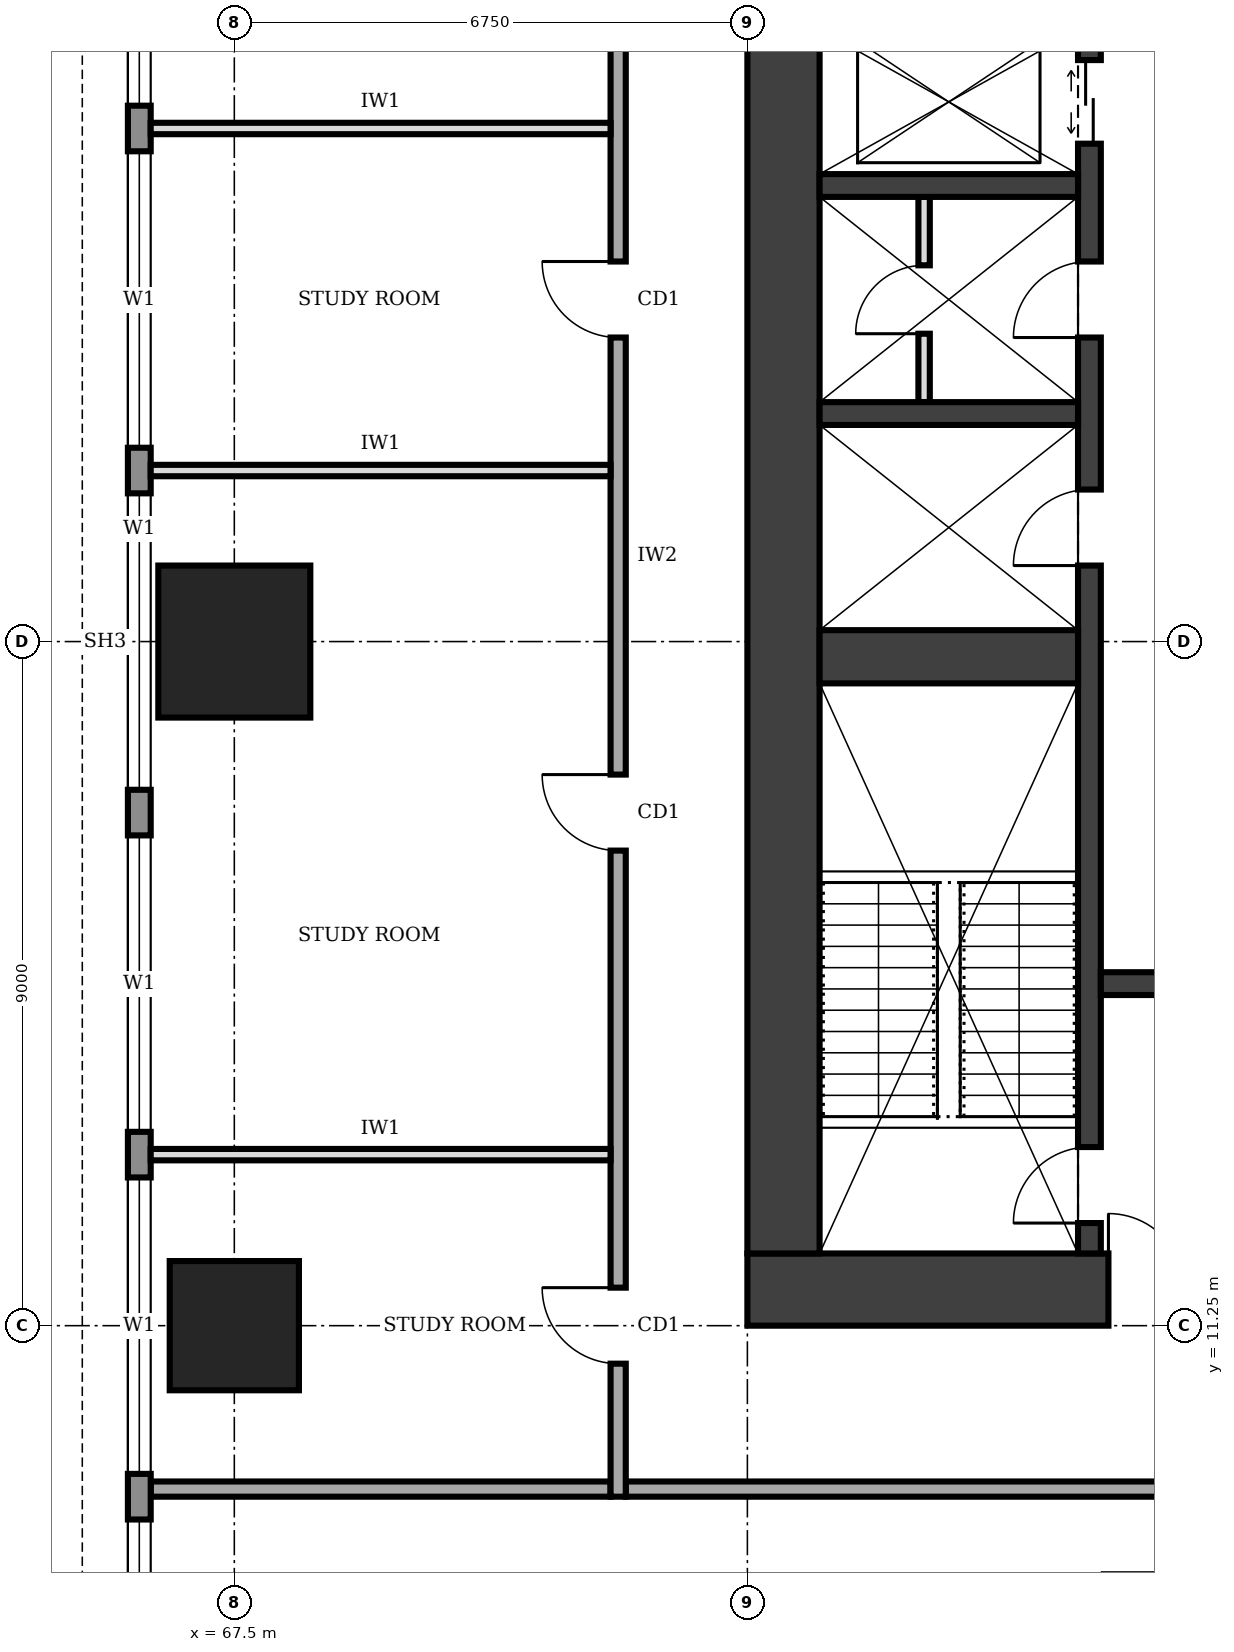
"""IFC4 building model, lengths in metres.
Left out: names, types, materials, properties, quantities, classifications, styles, units other than length and angle.
Written with IfcOpenShell. Run it as: python <this file> out.ifc"""

import sys

from ifc_helpers import new_model, si_unit, direction, frame, frame_2d, origin, origin_2d, place, context, subcontext, project, spatial, rectangle, extrude, element, fill, save


model = new_model("IFC4")
c1 = context("Model", 3, precision=1e-05, world=origin(), true_north=direction((0.0, 1.0)))
c2 = subcontext(c1, "Body", "Model", "MODEL_VIEW")
j1 = project(units=[si_unit("LENGTHUNIT", "METRE"), si_unit("PLANEANGLEUNIT", "RADIAN")], contexts=[c1])
p1 = place(None, origin())
s1 = spatial("IfcSite", under=j1, at=p1, CompositionType="ELEMENT")
p2 = place(p1, origin())
s2 = spatial("IfcBuilding", under=s1, at=p2, CompositionType="ELEMENT")
p3 = place(p2, frame((0.0, 0.0, 217.0)))
s3 = spatial("IfcBuildingStorey", under=s2, at=p3, CompositionType="ELEMENT", Elevation=217.0)
p4 = place(p3, frame((74.25, 11.725, 0.0), z_axis=(0.0, 0.0, 1.0), x_axis=(1.0, 0.0, 0.0)))
e1 = element("IfcWall", 1, at=p4, inside=s3, PredefinedType="SHEAR", context=c2, shape_type="SweptSolid", body=[
    extrude(rectangle(XDim=13.5, YDim=0.95, at=frame_2d((6.75, 0.0))), origin(), (0.0, 0.0, 1.0), 4.0),
])
p5 = place(p4, frame((4.75, 0.0, 0.0)))
e2 = element("IfcOpeningElement", 2, at=p5, cuts=e1, PredefinedType="OPENING", context=c2, shape_type="SweptSolid", body=[
    extrude(rectangle(XDim=1.0, YDim=2.1, at=frame_2d((0.5, 1.05))), frame((0.0, 0.485, 0.0), z_axis=(0.0, -1.0, 0.0), x_axis=(1.0, 0.0, 0.0)), (0.0, 0.0, 1.0), 0.97),
])
p6 = place(p3, frame((74.725, 28.3, 0.0), z_axis=(0.0, 0.0, 1.0), x_axis=(0.0, -1.0, 0.0)))
e3 = element("IfcWall", 3, at=p6, inside=s3, PredefinedType="SHEAR", context=c2, shape_type="SweptSolid", body=[
    extrude(rectangle(XDim=16.1, YDim=0.95, at=frame_2d((8.05, 0.0))), origin(), (0.0, 0.0, 1.0), 4.0),
])
p7 = place(p3, frame((78.75, 12.2, 0.0), z_axis=(0.0, 0.0, 1.0), x_axis=(0.0, 1.0, 0.0)))
e4 = element("IfcWall", 4, at=p7, inside=s3, PredefinedType="SHEAR", context=c2, shape_type="SweptSolid", body=[
    extrude(rectangle(XDim=16.1, YDim=0.3, at=frame_2d((8.05, 0.0))), origin(), (0.0, 0.0, 1.0), 4.0),
])
p8 = place(p7, frame((0.4, 0.0, 0.0)))
e5 = element("IfcOpeningElement", 5, at=p8, cuts=e4, PredefinedType="OPENING", context=c2, shape_type="SweptSolid", body=[
    extrude(rectangle(XDim=1.0, YDim=2.1, at=frame_2d((0.5, 1.05))), frame((0.0, 0.16, 0.0), z_axis=(0.0, -1.0, 0.0), x_axis=(1.0, 0.0, 0.0)), (0.0, 0.0, 1.0), 0.32),
])
p9 = place(p7, frame((14.6, 0.0, 0.0)))
e6 = element("IfcOpeningElement", 6, at=p9, cuts=e4, PredefinedType="OPENING", context=c2, shape_type="SweptSolid", body=[
    extrude(rectangle(XDim=1.1, YDim=2.1, at=frame_2d((0.55, 1.05))), frame((0.0, 0.16, 0.0), z_axis=(0.0, -1.0, 0.0), x_axis=(1.0, 0.0, 0.0)), (0.0, 0.0, 1.0), 0.32),
])
p10 = place(p7, frame((9.05, 0.0, 0.0)))
e7 = element("IfcOpeningElement", 7, at=p10, cuts=e4, PredefinedType="OPENING", context=c2, shape_type="SweptSolid", body=[
    extrude(rectangle(XDim=1.0, YDim=2.1, at=frame_2d((0.5, 1.05))), frame((0.0, 0.16, 0.0), z_axis=(0.0, -1.0, 0.0), x_axis=(1.0, 0.0, 0.0)), (0.0, 0.0, 1.0), 0.32),
])
p11 = place(p7, frame((12.05, 0.0, 0.0)))
e8 = element("IfcOpeningElement", 8, at=p11, cuts=e4, PredefinedType="OPENING", context=c2, shape_type="SweptSolid", body=[
    extrude(rectangle(XDim=1.0, YDim=2.1, at=frame_2d((0.5, 1.05))), frame((0.0, 0.16, 0.0), z_axis=(0.0, -1.0, 0.0), x_axis=(1.0, 0.0, 0.0)), (0.0, 0.0, 1.0), 0.32),
])
p12 = place(p3, frame((75.2, 20.05, 0.0), z_axis=(0.0, 0.0, 1.0), x_axis=(1.0, 0.0, 0.0)))
e9 = element("IfcWall", 9, at=p12, inside=s3, PredefinedType="SHEAR", context=c2, shape_type="SweptSolid", body=[
    extrude(rectangle(XDim=3.4, YDim=0.7, at=frame_2d((1.7, 0.0))), origin(), (0.0, 0.0, 1.0), 4.0),
])
p13 = place(p3, frame((78.9, 15.75, 0.0), z_axis=(0.0, 0.0, 1.0), x_axis=(1.0, 0.0, 0.0)))
e10 = element("IfcWall", 10, at=p13, inside=s3, PredefinedType="SHEAR", context=c2, shape_type="SweptSolid", body=[
    extrude(rectangle(XDim=4.2, YDim=0.3, at=frame_2d((2.1, 0.0))), origin(), (0.0, 0.0, 1.0), 4.0),
])
p14 = place(p13, frame((1.6, 0.0, 0.0)))
e11 = element("IfcOpeningElement", 11, at=p14, cuts=e10, PredefinedType="OPENING", context=c2, shape_type="SweptSolid", body=[
    extrude(rectangle(XDim=1.0, YDim=2.1, at=frame_2d((0.5, 1.05))), frame((0.0, 0.16, 0.0), z_axis=(0.0, -1.0, 0.0), x_axis=(1.0, 0.0, 0.0)), (0.0, 0.0, 1.0), 0.32),
])
for number, where, z_axis, x_axis in (
    (12, (75.2, 23.25, 0.0), (0.0, 0.0, 1.0), (1.0, 0.0, 0.0)),
    (13, (75.2, 26.25, 0.0), (0.0, 0.0, 1.0), (1.0, 0.0, 0.0)),
):
    element("IfcWall", number, at=place(p3, frame(where, z_axis=z_axis, x_axis=x_axis)), inside=s3, PredefinedType="SHEAR", context=c2, shape_type="SweptSolid", body=[
        extrude(rectangle(XDim=3.4, YDim=0.3, at=frame_2d((1.7, 0.0))), origin(), (0.0, 0.0, 1.0), 4.0),
    ])
p15 = place(p3, frame((67.5, 11.25, 0.0), z_axis=(0.0, 0.0, 1.0), x_axis=(1.0, 0.0, 0.0)))
e14 = element("IfcColumn", 14, at=p15, inside=s3, PredefinedType="COLUMN", context=c2, shape_type="SweptSolid", body=[
    extrude(rectangle(XDim=1.7, YDim=1.7, at=origin_2d()), origin(), (0.0, 0.0, 1.0), 4.0),
])
p16 = place(p3, frame((67.5, 20.25, 0.0), z_axis=(0.0, 0.0, 1.0), x_axis=(1.0, 0.0, 0.0)))
e15 = element("IfcColumn", 15, at=p16, inside=s3, PredefinedType="COLUMN", context=c2, shape_type="SweptSolid", body=[
    extrude(rectangle(XDim=2.0, YDim=2.0, at=origin_2d()), origin(), (0.0, 0.0, 1.0), 4.0),
])
p17 = place(p3, frame((66.25, 37.18, 0.0), z_axis=(0.0, 0.0, 1.0), x_axis=(0.0, -1.0, 0.0)))
e16 = element("IfcWall", 16, at=p17, inside=s3, PredefinedType="STANDARD", context=c2, shape_type="SweptSolid", body=[
    extrude(rectangle(XDim=33.86, YDim=0.3, at=frame_2d((16.93, 0.0))), origin(), (0.0, 0.0, 1.0), 3.75),
])
p18 = place(p17, frame((28.48, 0.0, 0.9)))
e17 = element("IfcOpeningElement", 17, at=p18, cuts=e16, PredefinedType="OPENING", context=c2, shape_type="SweptSolid", body=[
    extrude(rectangle(XDim=3.9, YDim=2.2, at=frame_2d((1.95, 1.1))), frame((0.0, 0.16, 0.0), z_axis=(0.0, -1.0, 0.0), x_axis=(1.0, 0.0, 0.0)), (0.0, 0.0, 1.0), 0.32),
])
p19 = place(p17, frame((23.98, 0.0, 0.9)))
e18 = element("IfcOpeningElement", 18, at=p19, cuts=e16, PredefinedType="OPENING", context=c2, shape_type="SweptSolid", body=[
    extrude(rectangle(XDim=3.9, YDim=2.2, at=frame_2d((1.95, 1.1))), frame((0.0, 0.16, 0.0), z_axis=(0.0, -1.0, 0.0), x_axis=(1.0, 0.0, 0.0)), (0.0, 0.0, 1.0), 0.32),
])
p20 = place(p17, frame((19.48, 0.0, 0.9)))
e19 = element("IfcOpeningElement", 19, at=p20, cuts=e16, PredefinedType="OPENING", context=c2, shape_type="SweptSolid", body=[
    extrude(rectangle(XDim=3.9, YDim=2.2, at=frame_2d((1.95, 1.1))), frame((0.0, 0.16, 0.0), z_axis=(0.0, -1.0, 0.0), x_axis=(1.0, 0.0, 0.0)), (0.0, 0.0, 1.0), 0.32),
])
p21 = place(p17, frame((14.98, 0.0, 0.9)))
e20 = element("IfcOpeningElement", 20, at=p21, cuts=e16, PredefinedType="OPENING", context=c2, shape_type="SweptSolid", body=[
    extrude(rectangle(XDim=3.9, YDim=2.2, at=frame_2d((1.95, 1.1))), frame((0.0, 0.16, 0.0), z_axis=(0.0, -1.0, 0.0), x_axis=(1.0, 0.0, 0.0)), (0.0, 0.0, 1.0), 0.32),
])
p22 = place(p17, frame((10.48, 0.0, 0.9)))
e21 = element("IfcOpeningElement", 21, at=p22, cuts=e16, PredefinedType="OPENING", context=c2, shape_type="SweptSolid", body=[
    extrude(rectangle(XDim=3.9, YDim=2.2, at=frame_2d((1.95, 1.1))), frame((0.0, 0.16, 0.0), z_axis=(0.0, -1.0, 0.0), x_axis=(1.0, 0.0, 0.0)), (0.0, 0.0, 1.0), 0.32),
])
p23 = place(p17, frame((5.98, 0.0, 0.9)))
e22 = element("IfcOpeningElement", 22, at=p23, cuts=e16, PredefinedType="OPENING", context=c2, shape_type="SweptSolid", body=[
    extrude(rectangle(XDim=3.9, YDim=2.2, at=frame_2d((1.95, 1.1))), frame((0.0, 0.16, 0.0), z_axis=(0.0, -1.0, 0.0), x_axis=(1.0, 0.0, 0.0)), (0.0, 0.0, 1.0), 0.32),
])
p24 = place(p17, frame((1.48, 0.0, 0.9)))
e23 = element("IfcOpeningElement", 23, at=p24, cuts=e16, PredefinedType="OPENING", context=c2, shape_type="SweptSolid", body=[
    extrude(rectangle(XDim=3.9, YDim=2.2, at=frame_2d((1.95, 1.1))), frame((0.0, 0.16, 0.0), z_axis=(0.0, -1.0, 0.0), x_axis=(1.0, 0.0, 0.0)), (0.0, 0.0, 1.0), 0.32),
])
p25 = place(p3, frame((76.575, 23.4, 0.0), z_axis=(0.0, 0.0, 1.0), x_axis=(0.0, 1.0, 0.0)))
e24 = element("IfcWall", 24, at=p25, inside=s3, PredefinedType="PARTITIONING", context=c2, shape_type="SweptSolid", body=[
    extrude(rectangle(XDim=2.7, YDim=0.15, at=frame_2d((1.35, 0.0))), origin(), (0.0, 0.0, 1.0), 3.75),
])
p26 = place(p25, frame((0.9, 0.0, 0.0)))
e25 = element("IfcOpeningElement", 25, at=p26, cuts=e24, PredefinedType="OPENING", context=c2, shape_type="SweptSolid", body=[
    extrude(rectangle(XDim=0.9, YDim=2.1, at=frame_2d((0.45, 1.05))), frame((0.0, 0.085, 0.0), z_axis=(0.0, -1.0, 0.0), x_axis=(1.0, 0.0, 0.0)), (0.0, 0.0, 1.0), 0.17),
])
p27 = place(p3, frame((72.65, 9.1, 0.0), z_axis=(0.0, 0.0, 1.0), x_axis=(1.0, 0.0, 0.0)))
e26 = element("IfcWall", 26, at=p27, inside=s3, PredefinedType="SOLIDWALL", context=c2, shape_type="SweptSolid", body=[
    extrude(rectangle(XDim=16.9, YDim=0.2, at=frame_2d((8.45, 0.0))), origin(), (0.0, 0.0, 1.0), 3.75),
])
p28 = place(p3, frame((72.55, 32.8, 0.0), z_axis=(0.0, 0.0, 1.0), x_axis=(0.0, -1.0, 0.0)))
e27 = element("IfcWall", 27, at=p28, inside=s3, PredefinedType="SOLIDWALL", context=c2, shape_type="SweptSolid", body=[
    extrude(rectangle(XDim=23.8, YDim=0.2, at=frame_2d((11.9, 0.0))), origin(), (0.0, 0.0, 1.0), 3.75),
])
p29 = place(p28, frame((21.05, 0.0, 0.0)))
e28 = element("IfcOpeningElement", 28, at=p29, cuts=e27, PredefinedType="OPENING", context=c2, shape_type="SweptSolid", body=[
    extrude(rectangle(XDim=1.0, YDim=2.1, at=frame_2d((0.5, 1.05))), frame((0.0, 0.11, 0.0), z_axis=(0.0, -1.0, 0.0), x_axis=(1.0, 0.0, 0.0)), (0.0, 0.0, 1.0), 0.22),
])
p30 = place(p28, frame((14.3, 0.0, 0.0)))
e29 = element("IfcOpeningElement", 29, at=p30, cuts=e27, PredefinedType="OPENING", context=c2, shape_type="SweptSolid", body=[
    extrude(rectangle(XDim=1.0, YDim=2.1, at=frame_2d((0.5, 1.05))), frame((0.0, 0.11, 0.0), z_axis=(0.0, -1.0, 0.0), x_axis=(1.0, 0.0, 0.0)), (0.0, 0.0, 1.0), 0.22),
])
p31 = place(p28, frame((7.55, 0.0, 0.0)))
e30 = element("IfcOpeningElement", 30, at=p31, cuts=e27, PredefinedType="OPENING", context=c2, shape_type="SweptSolid", body=[
    extrude(rectangle(XDim=1.0, YDim=2.1, at=frame_2d((0.5, 1.05))), frame((0.0, 0.11, 0.0), z_axis=(0.0, -1.0, 0.0), x_axis=(1.0, 0.0, 0.0)), (0.0, 0.0, 1.0), 0.22),
])
p32 = place(p28, frame((2.3, 0.0, 0.0)))
e31 = element("IfcOpeningElement", 31, at=p32, cuts=e27, PredefinedType="OPENING", context=c2, shape_type="SweptSolid", body=[
    extrude(rectangle(XDim=1.0, YDim=2.1, at=frame_2d((0.5, 1.05))), frame((0.0, 0.11, 0.0), z_axis=(0.0, -1.0, 0.0), x_axis=(1.0, 0.0, 0.0)), (0.0, 0.0, 1.0), 0.22),
])
p33 = place(p3, frame((66.4, 9.1, 0.0), z_axis=(0.0, 0.0, 1.0), x_axis=(1.0, 0.0, 0.0)))
e32 = element("IfcWall", 32, at=p33, inside=s3, PredefinedType="SOLIDWALL", context=c2, shape_type="SweptSolid", body=[
    extrude(rectangle(XDim=6.05, YDim=0.2, at=frame_2d((3.025, 0.0))), origin(), (0.0, 0.0, 1.0), 3.75),
])
for number, where, z_axis, x_axis in (
    (33, (66.4, 13.5, 0.0), (0.0, 0.0, 1.0), (1.0, 0.0, 0.0)),
    (34, (66.4, 22.5, 0.0), (0.0, 0.0, 1.0), (1.0, 0.0, 0.0)),
    (35, (66.4, 27.0, 0.0), (0.0, 0.0, 1.0), (1.0, 0.0, 0.0)),
):
    element("IfcWall", number, at=place(p3, frame(where, z_axis=z_axis, x_axis=x_axis)), inside=s3, PredefinedType="PARTITIONING", context=c2, shape_type="SweptSolid", body=[
        extrude(rectangle(XDim=6.05, YDim=0.15, at=frame_2d((3.025, 0.0))), origin(), (0.0, 0.0, 1.0), 3.75),
    ])
p34 = place(p18, origin())
e36 = element("IfcWindow", 36, at=p34, inside=s3, PartitioningType="SINGLE_PANEL", PredefinedType="WINDOW", context=c2, shape_type="SweptSolid", body=[
    extrude(rectangle(XDim=3.9, YDim=2.2, at=frame_2d((1.95, 1.1))), frame((0.0, 0.03, 0.0), z_axis=(0.0, -1.0, 0.0), x_axis=(1.0, 0.0, 0.0)), (0.0, 0.0, 1.0), 0.06),
])
fill(e17, e36)
p35 = place(p19, origin())
e37 = element("IfcWindow", 37, at=p35, inside=s3, PartitioningType="SINGLE_PANEL", PredefinedType="WINDOW", context=c2, shape_type="SweptSolid", body=[
    extrude(rectangle(XDim=3.9, YDim=2.2, at=frame_2d((1.95, 1.1))), frame((0.0, 0.03, 0.0), z_axis=(0.0, -1.0, 0.0), x_axis=(1.0, 0.0, 0.0)), (0.0, 0.0, 1.0), 0.06),
])
fill(e18, e37)
p36 = place(p20, origin())
e38 = element("IfcWindow", 38, at=p36, inside=s3, PartitioningType="SINGLE_PANEL", PredefinedType="WINDOW", context=c2, shape_type="SweptSolid", body=[
    extrude(rectangle(XDim=3.9, YDim=2.2, at=frame_2d((1.95, 1.1))), frame((0.0, 0.03, 0.0), z_axis=(0.0, -1.0, 0.0), x_axis=(1.0, 0.0, 0.0)), (0.0, 0.0, 1.0), 0.06),
])
fill(e19, e38)
p37 = place(p21, origin())
e39 = element("IfcWindow", 39, at=p37, inside=s3, PartitioningType="SINGLE_PANEL", PredefinedType="WINDOW", context=c2, shape_type="SweptSolid", body=[
    extrude(rectangle(XDim=3.9, YDim=2.2, at=frame_2d((1.95, 1.1))), frame((0.0, 0.03, 0.0), z_axis=(0.0, -1.0, 0.0), x_axis=(1.0, 0.0, 0.0)), (0.0, 0.0, 1.0), 0.06),
])
fill(e20, e39)
p38 = place(p22, origin())
e40 = element("IfcWindow", 40, at=p38, inside=s3, PartitioningType="SINGLE_PANEL", PredefinedType="WINDOW", context=c2, shape_type="SweptSolid", body=[
    extrude(rectangle(XDim=3.9, YDim=2.2, at=frame_2d((1.95, 1.1))), frame((0.0, 0.03, 0.0), z_axis=(0.0, -1.0, 0.0), x_axis=(1.0, 0.0, 0.0)), (0.0, 0.0, 1.0), 0.06),
])
fill(e21, e40)
p39 = place(p23, origin())
e41 = element("IfcWindow", 41, at=p39, inside=s3, PartitioningType="SINGLE_PANEL", PredefinedType="WINDOW", context=c2, shape_type="SweptSolid", body=[
    extrude(rectangle(XDim=3.9, YDim=2.2, at=frame_2d((1.95, 1.1))), frame((0.0, 0.03, 0.0), z_axis=(0.0, -1.0, 0.0), x_axis=(1.0, 0.0, 0.0)), (0.0, 0.0, 1.0), 0.06),
])
fill(e22, e41)
p40 = place(p5, origin())
e42 = element("IfcDoor", 42, at=p40, inside=s3, OperationType="SINGLE_SWING_LEFT", PredefinedType="DOOR", context=c2, shape_type="SweptSolid", body=[
    extrude(rectangle(XDim=1.0, YDim=2.1, at=frame_2d((0.5, 1.05))), frame((0.0, 0.025, 0.0), z_axis=(0.0, -1.0, 0.0), x_axis=(1.0, 0.0, 0.0)), (0.0, 0.0, 1.0), 0.05),
])
fill(e2, e42)
p41 = place(p8, origin())
e43 = element("IfcDoor", 43, at=p41, inside=s3, OperationType="SINGLE_SWING_LEFT", PredefinedType="DOOR", context=c2, shape_type="SweptSolid", body=[
    extrude(rectangle(XDim=1.0, YDim=2.1, at=frame_2d((0.5, 1.05))), frame((0.0, 0.025, 0.0), z_axis=(0.0, -1.0, 0.0), x_axis=(1.0, 0.0, 0.0)), (0.0, 0.0, 1.0), 0.05),
])
fill(e5, e43)
p42 = place(p9, origin())
e44 = element("IfcDoor", 44, at=p42, inside=s3, OperationType="DOUBLE_DOOR_SLIDING", PredefinedType="DOOR", context=c2, shape_type="SweptSolid", body=[
    extrude(rectangle(XDim=1.1, YDim=2.1, at=frame_2d((0.55, 1.05))), frame((0.0, 0.025, 0.0), z_axis=(0.0, -1.0, 0.0), x_axis=(1.0, 0.0, 0.0)), (0.0, 0.0, 1.0), 0.05),
])
fill(e6, e44)
p43 = place(p10, origin())
e45 = element("IfcDoor", 45, at=p43, inside=s3, OperationType="SINGLE_SWING_LEFT", PredefinedType="DOOR", context=c2, shape_type="SweptSolid", body=[
    extrude(rectangle(XDim=1.0, YDim=2.1, at=frame_2d((0.5, 1.05))), frame((0.0, 0.025, 0.0), z_axis=(0.0, -1.0, 0.0), x_axis=(1.0, 0.0, 0.0)), (0.0, 0.0, 1.0), 0.05),
])
fill(e7, e45)
p44 = place(p11, origin())
e46 = element("IfcDoor", 46, at=p44, inside=s3, OperationType="SINGLE_SWING_LEFT", PredefinedType="DOOR", context=c2, shape_type="SweptSolid", body=[
    extrude(rectangle(XDim=1.0, YDim=2.1, at=frame_2d((0.5, 1.05))), frame((0.0, 0.025, 0.0), z_axis=(0.0, -1.0, 0.0), x_axis=(1.0, 0.0, 0.0)), (0.0, 0.0, 1.0), 0.05),
])
fill(e8, e46)
p45 = place(p26, origin())
e47 = element("IfcDoor", 47, at=p45, inside=s3, OperationType="SINGLE_SWING_LEFT", PredefinedType="DOOR", context=c2, shape_type="SweptSolid", body=[
    extrude(rectangle(XDim=0.9, YDim=2.1, at=frame_2d((0.45, 1.05))), frame((0.0, 0.025, 0.0), z_axis=(0.0, -1.0, 0.0), x_axis=(1.0, 0.0, 0.0)), (0.0, 0.0, 1.0), 0.05),
])
fill(e25, e47)
p46 = place(p29, frame((1.0, 0.0, 0.0), z_axis=(0.0, 0.0, 1.0), x_axis=(-1.0, 0.0, 0.0)))
e48 = element("IfcDoor", 48, at=p46, inside=s3, OperationType="SINGLE_SWING_RIGHT", PredefinedType="DOOR", context=c2, shape_type="SweptSolid", body=[
    extrude(rectangle(XDim=1.0, YDim=2.1, at=frame_2d((0.5, 1.05))), frame((0.0, 0.025, 0.0), z_axis=(0.0, -1.0, 0.0), x_axis=(1.0, 0.0, 0.0)), (0.0, 0.0, 1.0), 0.05),
])
fill(e28, e48)
p47 = place(p30, frame((1.0, 0.0, 0.0), z_axis=(0.0, 0.0, 1.0), x_axis=(-1.0, 0.0, 0.0)))
e49 = element("IfcDoor", 49, at=p47, inside=s3, OperationType="SINGLE_SWING_RIGHT", PredefinedType="DOOR", context=c2, shape_type="SweptSolid", body=[
    extrude(rectangle(XDim=1.0, YDim=2.1, at=frame_2d((0.5, 1.05))), frame((0.0, 0.025, 0.0), z_axis=(0.0, -1.0, 0.0), x_axis=(1.0, 0.0, 0.0)), (0.0, 0.0, 1.0), 0.05),
])
fill(e29, e49)
p48 = place(p31, frame((1.0, 0.0, 0.0), z_axis=(0.0, 0.0, 1.0), x_axis=(-1.0, 0.0, 0.0)))
e50 = element("IfcDoor", 50, at=p48, inside=s3, OperationType="SINGLE_SWING_RIGHT", PredefinedType="DOOR", context=c2, shape_type="SweptSolid", body=[
    extrude(rectangle(XDim=1.0, YDim=2.1, at=frame_2d((0.5, 1.05))), frame((0.0, 0.025, 0.0), z_axis=(0.0, -1.0, 0.0), x_axis=(1.0, 0.0, 0.0)), (0.0, 0.0, 1.0), 0.05),
])
fill(e30, e50)
save(model, sys.argv[1])
